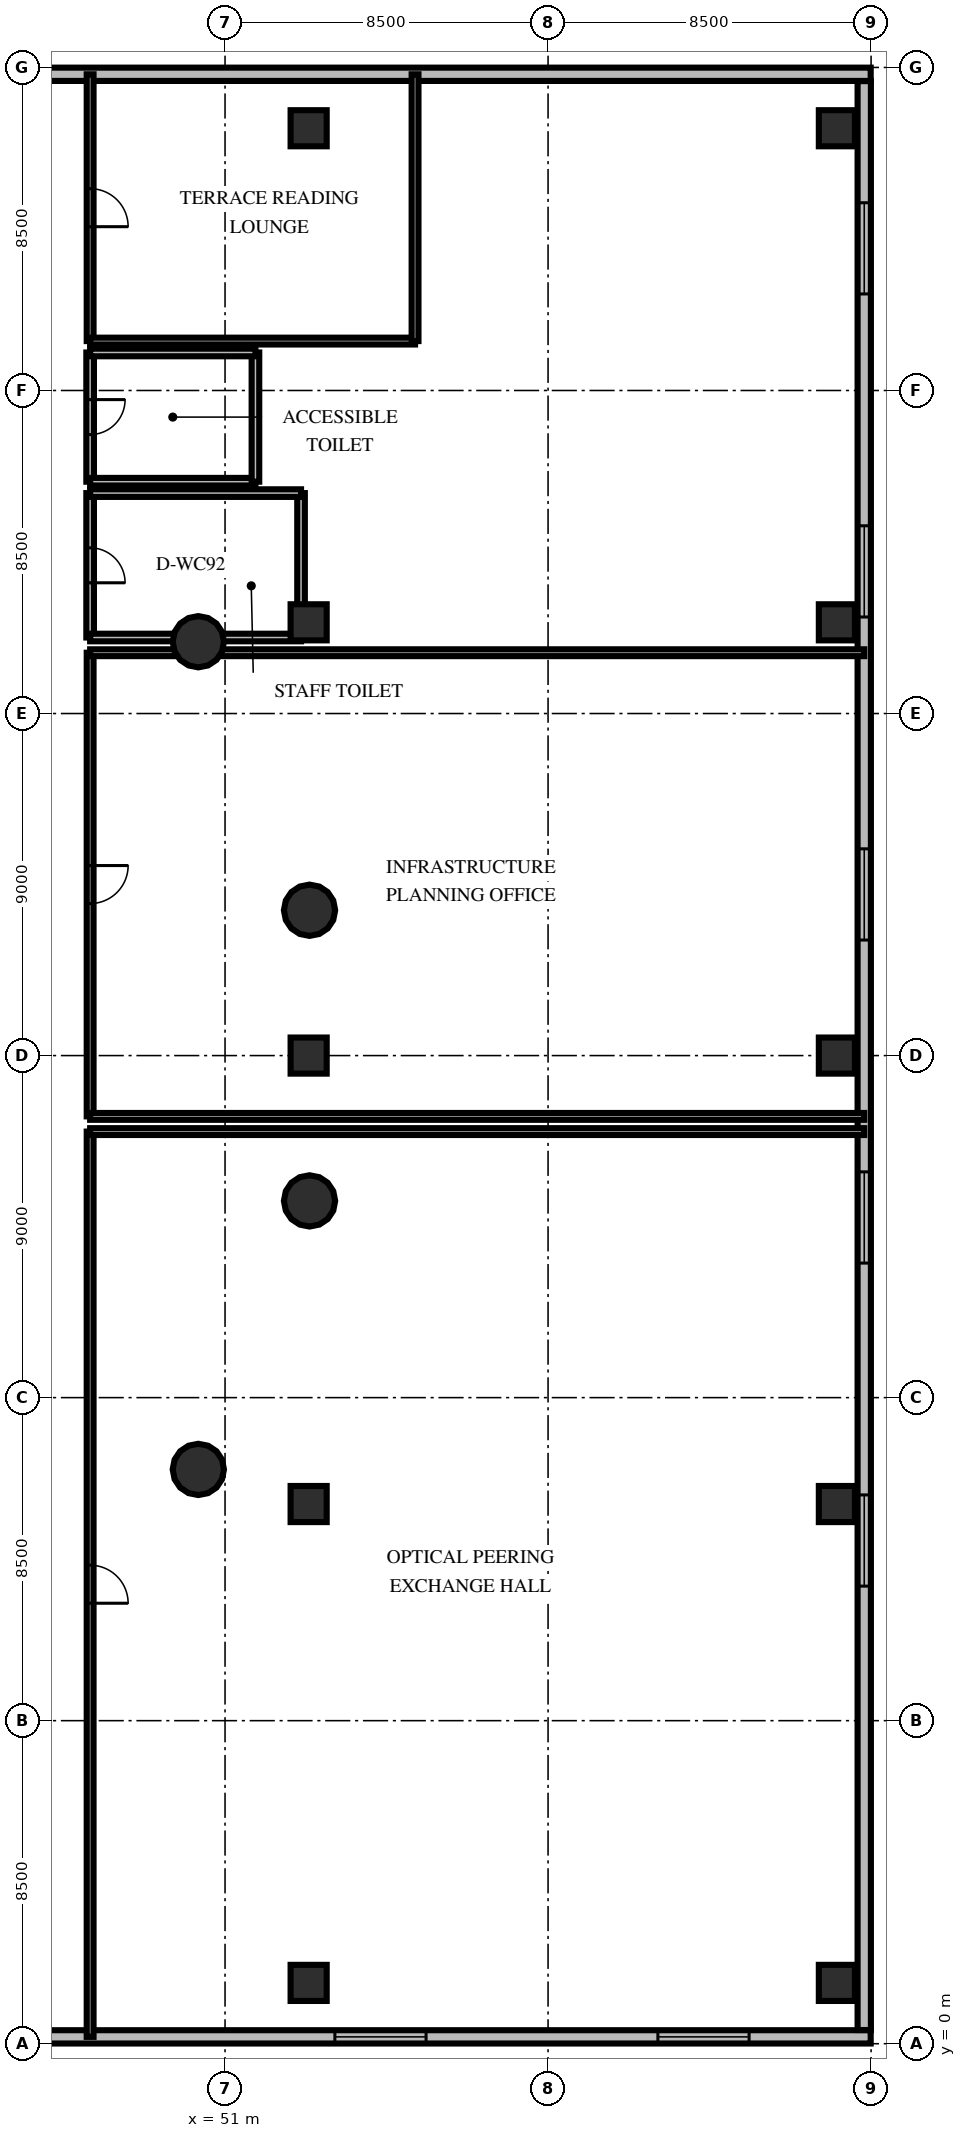
"""IFC4 building model, lengths in metres.
Left out: names, types, materials, properties, quantities, classifications, styles, units other than length and angle.
Written with IfcOpenShell. Run it as: python <this file> out.ifc"""

import sys

from ifc_helpers import new_model, si_unit, direction, frame, frame_2d, origin, origin_2d, place, context, subcontext, project, spatial, rectangle, circle, extrude, element, fill, save


model = new_model("IFC4")
c1 = context("Model", 3, precision=1e-05, world=origin(), true_north=direction((0.0, 1.0)))
c2 = subcontext(c1, "Body", "Model", "MODEL_VIEW")
j1 = project(units=[si_unit("LENGTHUNIT", "METRE"), si_unit("PLANEANGLEUNIT", "RADIAN")], contexts=[c1])
p1 = place(None, origin())
s1 = spatial("IfcSite", under=j1, at=p1, CompositionType="ELEMENT")
p2 = place(p1, origin())
s2 = spatial("IfcBuilding", under=s1, at=p2, CompositionType="ELEMENT")
p3 = place(p2, frame((0.0, 0.0, 20.4)))
s3 = spatial("IfcBuildingStorey", under=s2, at=p3, CompositionType="ELEMENT", Elevation=20.4)
for number, where, z_axis, x_axis in (
    (1, (53.2, 1.6, 0.0), (0.0, 0.0, 1.0), (1.0, 0.0, 0.0)),
    (2, (53.2, 14.2, 0.0), (0.0, 0.0, 1.0), (1.0, 0.0, 0.0)),
    (3, (53.2, 26.0, 0.0), (0.0, 0.0, 1.0), (1.0, 0.0, 0.0)),
    (4, (53.2, 37.4, 0.0), (0.0, 0.0, 1.0), (1.0, 0.0, 0.0)),
    (5, (53.2, 50.4, 0.0), (0.0, 0.0, 1.0), (1.0, 0.0, 0.0)),
    (6, (67.1, 1.6, 0.0), (0.0, 0.0, 1.0), (1.0, 0.0, 0.0)),
    (7, (67.1, 14.2, 0.0), (0.0, 0.0, 1.0), (1.0, 0.0, 0.0)),
    (8, (67.1, 26.0, 0.0), (0.0, 0.0, 1.0), (1.0, 0.0, 0.0)),
    (9, (67.1, 37.4, 0.0), (0.0, 0.0, 1.0), (1.0, 0.0, 0.0)),
    (10, (67.1, 50.4, 0.0), (0.0, 0.0, 1.0), (1.0, 0.0, 0.0)),
):
    element("IfcColumn", number, at=place(p3, frame(where, z_axis=z_axis, x_axis=x_axis)), inside=s3, PredefinedType="COLUMN", context=c2, shape_type="SweptSolid", body=[
        extrude(rectangle(XDim=0.95, YDim=0.95, at=origin_2d()), origin(), (0.0, 0.0, 1.0), 4.8),
    ])
for number, where, z_axis, x_axis in (
    (11, (53.223, 29.824, 0.0), (0.0, 0.0, 1.0), (1.0, 0.0, 0.0)),
    (12, (50.297, 36.889, 0.0), (0.0, 0.0, 1.0), (1.0, 0.0, 0.0)),
    (13, (50.297, 15.111, 0.0), (0.0, 0.0, 1.0), (1.0, 0.0, 0.0)),
    (14, (53.223, 22.176, 0.0), (0.0, 0.0, 1.0), (1.0, 0.0, 0.0)),
):
    element("IfcColumn", number, at=place(p3, frame(where, z_axis=z_axis, x_axis=x_axis)), inside=s3, PredefinedType="COLUMN", context=c2, shape_type="SweptSolid", body=[
        extrude(circle(Radius=0.675, at=origin_2d()), origin(), (0.0, 0.0, 1.0), 4.8),
    ])
p4 = place(p3, frame((67.99, 0.18, 0.0), z_axis=(0.0, 0.0, 1.0), x_axis=(-1.0, 0.0, 0.0)))
e15 = element("IfcWall", 15, at=p4, inside=s3, PredefinedType="SOLIDWALL", context=c2, shape_type="SweptSolid", body=[
    extrude(rectangle(XDim=25.42, YDim=0.35, at=frame_2d((12.71, 0.0))), origin(), (0.0, 0.0, 1.0), 3.76),
])
p5 = place(p4, frame((3.2, 0.0, 0.85)))
e16 = element("IfcOpeningElement", 16, at=p5, cuts=e15, PredefinedType="OPENING", context=c2, shape_type="SweptSolid", body=[
    extrude(rectangle(XDim=2.4, YDim=2.4, at=frame_2d((1.2, 1.2))), frame((0.0, 0.185, 0.0), z_axis=(0.0, -1.0, 0.0), x_axis=(1.0, 0.0, 0.0)), (0.0, 0.0, 1.0), 0.37),
])
p6 = place(p4, frame((11.7, 0.0, 0.85)))
e17 = element("IfcOpeningElement", 17, at=p6, cuts=e15, PredefinedType="OPENING", context=c2, shape_type="SweptSolid", body=[
    extrude(rectangle(XDim=2.4, YDim=2.4, at=frame_2d((1.2, 1.2))), frame((0.0, 0.185, 0.0), z_axis=(0.0, -1.0, 0.0), x_axis=(1.0, 0.0, 0.0)), (0.0, 0.0, 1.0), 0.37),
])
p7 = place(p3, frame((67.82, 51.64, 0.0), z_axis=(0.0, 0.0, 1.0), x_axis=(0.0, -1.0, 0.0)))
e18 = element("IfcWall", 18, at=p7, inside=s3, PredefinedType="SOLIDWALL", context=c2, shape_type="SweptSolid", body=[
    extrude(rectangle(XDim=51.28, YDim=0.35, at=frame_2d((25.64, 0.0))), origin(), (0.0, 0.0, 1.0), 3.76),
])
p8 = place(p7, frame((3.2, 0.0, 0.85)))
e19 = element("IfcOpeningElement", 19, at=p8, cuts=e18, PredefinedType="OPENING", context=c2, shape_type="SweptSolid", body=[
    extrude(rectangle(XDim=2.4, YDim=2.4, at=frame_2d((1.2, 1.2))), frame((0.0, 0.185, 0.0), z_axis=(0.0, -1.0, 0.0), x_axis=(1.0, 0.0, 0.0)), (0.0, 0.0, 1.0), 0.37),
])
p9 = place(p7, frame((11.7, 0.0, 0.85)))
e20 = element("IfcOpeningElement", 20, at=p9, cuts=e18, PredefinedType="OPENING", context=c2, shape_type="SweptSolid", body=[
    extrude(rectangle(XDim=2.4, YDim=2.4, at=frame_2d((1.2, 1.2))), frame((0.0, 0.185, 0.0), z_axis=(0.0, -1.0, 0.0), x_axis=(1.0, 0.0, 0.0)), (0.0, 0.0, 1.0), 0.37),
])
p10 = place(p7, frame((20.2, 0.0, 0.85)))
e21 = element("IfcOpeningElement", 21, at=p10, cuts=e18, PredefinedType="OPENING", context=c2, shape_type="SweptSolid", body=[
    extrude(rectangle(XDim=2.4, YDim=2.4, at=frame_2d((1.2, 1.2))), frame((0.0, 0.185, 0.0), z_axis=(0.0, -1.0, 0.0), x_axis=(1.0, 0.0, 0.0)), (0.0, 0.0, 1.0), 0.37),
])
p11 = place(p7, frame((28.7, 0.0, 0.85)))
e22 = element("IfcOpeningElement", 22, at=p11, cuts=e18, PredefinedType="OPENING", context=c2, shape_type="SweptSolid", body=[
    extrude(rectangle(XDim=2.4, YDim=2.4, at=frame_2d((1.2, 1.2))), frame((0.0, 0.185, 0.0), z_axis=(0.0, -1.0, 0.0), x_axis=(1.0, 0.0, 0.0)), (0.0, 0.0, 1.0), 0.37),
])
p12 = place(p7, frame((37.2, 0.0, 0.85)))
e23 = element("IfcOpeningElement", 23, at=p12, cuts=e18, PredefinedType="OPENING", context=c2, shape_type="SweptSolid", body=[
    extrude(rectangle(XDim=2.4, YDim=2.4, at=frame_2d((1.2, 1.2))), frame((0.0, 0.185, 0.0), z_axis=(0.0, -1.0, 0.0), x_axis=(1.0, 0.0, 0.0)), (0.0, 0.0, 1.0), 0.37),
])
p13 = place(p3, frame((42.57, 51.82, 0.0), z_axis=(0.0, 0.0, 1.0), x_axis=(1.0, 0.0, 0.0)))
e24 = element("IfcWall", 24, at=p13, inside=s3, PredefinedType="SOLIDWALL", context=c2, shape_type="SweptSolid", body=[
    extrude(rectangle(XDim=25.42, YDim=0.35, at=frame_2d((12.71, 0.0))), origin(), (0.0, 0.0, 1.0), 3.76),
])
p14 = place(p3, frame((47.45, 24.0, 0.0), z_axis=(0.0, 0.0, 1.0), x_axis=(0.0, -1.0, 0.0)))
e25 = element("IfcWall", 25, at=p14, inside=s3, PredefinedType="PARTITIONING", context=c2, shape_type="SweptSolid", body=[
    extrude(rectangle(XDim=23.82, YDim=0.18, at=frame_2d((11.91, 0.0))), origin(), (0.0, 0.0, 1.0), 3.56),
])
p15 = place(p14, frame((11.41, 0.0, 0.0)))
e26 = element("IfcOpeningElement", 26, at=p15, cuts=e25, PredefinedType="OPENING", context=c2, shape_type="SweptSolid", body=[
    extrude(rectangle(XDim=1.0, YDim=2.15, at=frame_2d((0.5, 1.075))), frame((0.0, 0.1, 0.0), z_axis=(0.0, -1.0, 0.0), x_axis=(1.0, 0.0, 0.0)), (0.0, 0.0, 1.0), 0.2),
])
p16 = place(p3, frame((67.82, 24.0, 0.0), z_axis=(0.0, 0.0, 1.0), x_axis=(-1.0, 0.0, 0.0)))
e27 = element("IfcWall", 27, at=p16, inside=s3, PredefinedType="PARTITIONING", context=c2, shape_type="SweptSolid", body=[
    extrude(rectangle(XDim=20.37, YDim=0.18, at=frame_2d((10.185, 0.0))), origin(), (0.0, 0.0, 1.0), 3.56),
])
p17 = place(p3, frame((47.45, 36.6, 0.0), z_axis=(0.0, 0.0, 1.0), x_axis=(0.0, -1.0, 0.0)))
e28 = element("IfcWall", 28, at=p17, inside=s3, PredefinedType="PARTITIONING", context=c2, shape_type="SweptSolid", body=[
    extrude(rectangle(XDim=12.2, YDim=0.18, at=frame_2d((6.1, 0.0))), origin(), (0.0, 0.0, 1.0), 3.56),
])
p18 = place(p17, frame((5.6, 0.0, 0.0)))
e29 = element("IfcOpeningElement", 29, at=p18, cuts=e28, PredefinedType="OPENING", context=c2, shape_type="SweptSolid", body=[
    extrude(rectangle(XDim=1.0, YDim=2.15, at=frame_2d((0.5, 1.075))), frame((0.0, 0.1, 0.0), z_axis=(0.0, -1.0, 0.0), x_axis=(1.0, 0.0, 0.0)), (0.0, 0.0, 1.0), 0.2),
])
for number, where, z_axis, x_axis in (
    (30, (47.45, 24.4, 0.0), (0.0, 0.0, 1.0), (1.0, 0.0, 0.0)),
    (31, (67.82, 36.6, 0.0), (0.0, 0.0, 1.0), (-1.0, 0.0, 0.0)),
):
    element("IfcWall", number, at=place(p3, frame(where, z_axis=z_axis, x_axis=x_axis)), inside=s3, PredefinedType="PARTITIONING", context=c2, shape_type="SweptSolid", body=[
        extrude(rectangle(XDim=20.37, YDim=0.18, at=frame_2d((10.185, 0.0))), origin(), (0.0, 0.0, 1.0), 3.56),
    ])
p19 = place(p3, frame((47.45, 40.8, 0.0), z_axis=(0.0, 0.0, 1.0), x_axis=(0.0, -1.0, 0.0)))
e32 = element("IfcWall", 32, at=p19, inside=s3, PredefinedType="PLUMBINGWALL", context=c2, shape_type="SweptSolid", body=[
    extrude(rectangle(XDim=3.8, YDim=0.2, at=frame_2d((1.9, 0.0))), origin(), (0.0, 0.0, 1.0), 3.56),
])
p20 = place(p19, frame((1.44, 0.0, 0.0)))
e33 = element("IfcOpeningElement", 33, at=p20, cuts=e32, PredefinedType="OPENING", context=c2, shape_type="SweptSolid", body=[
    extrude(rectangle(XDim=0.92, YDim=2.1, at=frame_2d((0.46, 1.05))), frame((0.0, 0.11, 0.0), z_axis=(0.0, -1.0, 0.0), x_axis=(1.0, 0.0, 0.0)), (0.0, 0.0, 1.0), 0.22),
])
p21 = place(p3, frame((47.45, 37.0, 0.0), z_axis=(0.0, 0.0, 1.0), x_axis=(1.0, 0.0, 0.0)))
e34 = element("IfcWall", 34, at=p21, inside=s3, PredefinedType="PLUMBINGWALL", context=c2, shape_type="SweptSolid", body=[
    extrude(rectangle(XDim=5.55, YDim=0.2, at=frame_2d((2.775, 0.0))), origin(), (0.0, 0.0, 1.0), 3.56),
])
p22 = place(p3, frame((53.0, 37.0, 0.0), z_axis=(0.0, 0.0, 1.0), x_axis=(0.0, 1.0, 0.0)))
e35 = element("IfcWall", 35, at=p22, inside=s3, PredefinedType="PLUMBINGWALL", context=c2, shape_type="SweptSolid", body=[
    extrude(rectangle(XDim=3.8, YDim=0.2, at=frame_2d((1.9, 0.0))), origin(), (0.0, 0.0, 1.0), 3.56),
])
p23 = place(p3, frame((53.0, 40.8, 0.0), z_axis=(0.0, 0.0, 1.0), x_axis=(-1.0, 0.0, 0.0)))
e36 = element("IfcWall", 36, at=p23, inside=s3, PredefinedType="PLUMBINGWALL", context=c2, shape_type="SweptSolid", body=[
    extrude(rectangle(XDim=5.55, YDim=0.2, at=frame_2d((2.775, 0.0))), origin(), (0.0, 0.0, 1.0), 3.56),
])
p24 = place(p3, frame((47.45, 44.5, 0.0), z_axis=(0.0, 0.0, 1.0), x_axis=(0.0, -1.0, 0.0)))
e37 = element("IfcWall", 37, at=p24, inside=s3, PredefinedType="PLUMBINGWALL", context=c2, shape_type="SweptSolid", body=[
    extrude(rectangle(XDim=3.4, YDim=0.2, at=frame_2d((1.7, 0.0))), origin(), (0.0, 0.0, 1.0), 3.56),
])
p25 = place(p24, frame((1.24, 0.0, 0.0)))
e38 = element("IfcOpeningElement", 38, at=p25, cuts=e37, PredefinedType="OPENING", context=c2, shape_type="SweptSolid", body=[
    extrude(rectangle(XDim=0.92, YDim=2.1, at=frame_2d((0.46, 1.05))), frame((0.0, 0.11, 0.0), z_axis=(0.0, -1.0, 0.0), x_axis=(1.0, 0.0, 0.0)), (0.0, 0.0, 1.0), 0.22),
])
p26 = place(p3, frame((47.45, 41.1, 0.0), z_axis=(0.0, 0.0, 1.0), x_axis=(1.0, 0.0, 0.0)))
e39 = element("IfcWall", 39, at=p26, inside=s3, PredefinedType="PLUMBINGWALL", context=c2, shape_type="SweptSolid", body=[
    extrude(rectangle(XDim=4.35, YDim=0.2, at=frame_2d((2.175, 0.0))), origin(), (0.0, 0.0, 1.0), 3.56),
])
p27 = place(p3, frame((51.8, 41.1, 0.0), z_axis=(0.0, 0.0, 1.0), x_axis=(0.0, 1.0, 0.0)))
e40 = element("IfcWall", 40, at=p27, inside=s3, PredefinedType="PLUMBINGWALL", context=c2, shape_type="SweptSolid", body=[
    extrude(rectangle(XDim=3.4, YDim=0.2, at=frame_2d((1.7, 0.0))), origin(), (0.0, 0.0, 1.0), 3.56),
])
p28 = place(p3, frame((51.8, 44.5, 0.0), z_axis=(0.0, 0.0, 1.0), x_axis=(-1.0, 0.0, 0.0)))
e41 = element("IfcWall", 41, at=p28, inside=s3, PredefinedType="PLUMBINGWALL", context=c2, shape_type="SweptSolid", body=[
    extrude(rectangle(XDim=4.35, YDim=0.2, at=frame_2d((2.175, 0.0))), origin(), (0.0, 0.0, 1.0), 3.56),
])
p29 = place(p3, frame((47.45, 51.82, 0.0), z_axis=(0.0, 0.0, 1.0), x_axis=(0.0, -1.0, 0.0)))
e42 = element("IfcWall", 42, at=p29, inside=s3, PredefinedType="PARTITIONING", context=c2, shape_type="SweptSolid", body=[
    extrude(rectangle(XDim=7.02, YDim=0.18, at=frame_2d((3.51, 0.0))), origin(), (0.0, 0.0, 1.0), 3.56),
])
p30 = place(p29, frame((3.01, 0.0, 0.0)))
e43 = element("IfcOpeningElement", 43, at=p30, cuts=e42, PredefinedType="OPENING", context=c2, shape_type="SweptSolid", body=[
    extrude(rectangle(XDim=1.0, YDim=2.15, at=frame_2d((0.5, 1.075))), frame((0.0, 0.1, 0.0), z_axis=(0.0, -1.0, 0.0), x_axis=(1.0, 0.0, 0.0)), (0.0, 0.0, 1.0), 0.2),
])
p31 = place(p3, frame((47.45, 44.8, 0.0), z_axis=(0.0, 0.0, 1.0), x_axis=(1.0, 0.0, 0.0)))
e44 = element("IfcWall", 44, at=p31, inside=s3, PredefinedType="PARTITIONING", context=c2, shape_type="SweptSolid", body=[
    extrude(rectangle(XDim=8.55, YDim=0.18, at=frame_2d((4.275, 0.0))), origin(), (0.0, 0.0, 1.0), 3.56),
])
p32 = place(p3, frame((56.0, 44.8, 0.0), z_axis=(0.0, 0.0, 1.0), x_axis=(0.0, 1.0, 0.0)))
e45 = element("IfcWall", 45, at=p32, inside=s3, PredefinedType="PARTITIONING", context=c2, shape_type="SweptSolid", body=[
    extrude(rectangle(XDim=7.02, YDim=0.18, at=frame_2d((3.51, 0.0))), origin(), (0.0, 0.0, 1.0), 3.56),
])
p33 = place(p5, origin())
e46 = element("IfcWindow", 46, at=p33, inside=s3, PartitioningType="SINGLE_PANEL", PredefinedType="WINDOW", context=c2, shape_type="SweptSolid", body=[
    extrude(rectangle(XDim=2.4, YDim=2.4, at=frame_2d((1.2, 1.2))), frame((0.0, 0.03, 0.0), z_axis=(0.0, -1.0, 0.0), x_axis=(1.0, 0.0, 0.0)), (0.0, 0.0, 1.0), 0.06),
])
fill(e16, e46)
p34 = place(p6, origin())
e47 = element("IfcWindow", 47, at=p34, inside=s3, PartitioningType="SINGLE_PANEL", PredefinedType="WINDOW", context=c2, shape_type="SweptSolid", body=[
    extrude(rectangle(XDim=2.4, YDim=2.4, at=frame_2d((1.2, 1.2))), frame((0.0, 0.03, 0.0), z_axis=(0.0, -1.0, 0.0), x_axis=(1.0, 0.0, 0.0)), (0.0, 0.0, 1.0), 0.06),
])
fill(e17, e47)
p35 = place(p8, origin())
e48 = element("IfcWindow", 48, at=p35, inside=s3, PartitioningType="SINGLE_PANEL", PredefinedType="WINDOW", context=c2, shape_type="SweptSolid", body=[
    extrude(rectangle(XDim=2.4, YDim=2.4, at=frame_2d((1.2, 1.2))), frame((0.0, 0.03, 0.0), z_axis=(0.0, -1.0, 0.0), x_axis=(1.0, 0.0, 0.0)), (0.0, 0.0, 1.0), 0.06),
])
fill(e19, e48)
p36 = place(p9, origin())
e49 = element("IfcWindow", 49, at=p36, inside=s3, PartitioningType="SINGLE_PANEL", PredefinedType="WINDOW", context=c2, shape_type="SweptSolid", body=[
    extrude(rectangle(XDim=2.4, YDim=2.4, at=frame_2d((1.2, 1.2))), frame((0.0, 0.03, 0.0), z_axis=(0.0, -1.0, 0.0), x_axis=(1.0, 0.0, 0.0)), (0.0, 0.0, 1.0), 0.06),
])
fill(e20, e49)
p37 = place(p10, origin())
e50 = element("IfcWindow", 50, at=p37, inside=s3, PartitioningType="SINGLE_PANEL", PredefinedType="WINDOW", context=c2, shape_type="SweptSolid", body=[
    extrude(rectangle(XDim=2.4, YDim=2.4, at=frame_2d((1.2, 1.2))), frame((0.0, 0.03, 0.0), z_axis=(0.0, -1.0, 0.0), x_axis=(1.0, 0.0, 0.0)), (0.0, 0.0, 1.0), 0.06),
])
fill(e21, e50)
p38 = place(p11, origin())
e51 = element("IfcWindow", 51, at=p38, inside=s3, PartitioningType="SINGLE_PANEL", PredefinedType="WINDOW", context=c2, shape_type="SweptSolid", body=[
    extrude(rectangle(XDim=2.4, YDim=2.4, at=frame_2d((1.2, 1.2))), frame((0.0, 0.03, 0.0), z_axis=(0.0, -1.0, 0.0), x_axis=(1.0, 0.0, 0.0)), (0.0, 0.0, 1.0), 0.06),
])
fill(e22, e51)
p39 = place(p12, origin())
e52 = element("IfcWindow", 52, at=p39, inside=s3, PartitioningType="SINGLE_PANEL", PredefinedType="WINDOW", context=c2, shape_type="SweptSolid", body=[
    extrude(rectangle(XDim=2.4, YDim=2.4, at=frame_2d((1.2, 1.2))), frame((0.0, 0.03, 0.0), z_axis=(0.0, -1.0, 0.0), x_axis=(1.0, 0.0, 0.0)), (0.0, 0.0, 1.0), 0.06),
])
fill(e23, e52)
p40 = place(p15, origin())
e53 = element("IfcDoor", 53, at=p40, inside=s3, OperationType="SINGLE_SWING_RIGHT", PredefinedType="DOOR", context=c2, shape_type="SweptSolid", body=[
    extrude(rectangle(XDim=1.0, YDim=2.15, at=frame_2d((0.5, 1.075))), frame((0.0, 0.025, 0.0), z_axis=(0.0, -1.0, 0.0), x_axis=(1.0, 0.0, 0.0)), (0.0, 0.0, 1.0), 0.05),
])
fill(e26, e53)
p41 = place(p18, origin())
e54 = element("IfcDoor", 54, at=p41, inside=s3, OperationType="SINGLE_SWING_LEFT", PredefinedType="DOOR", context=c2, shape_type="SweptSolid", body=[
    extrude(rectangle(XDim=1.0, YDim=2.15, at=frame_2d((0.5, 1.075))), frame((0.0, 0.025, 0.0), z_axis=(0.0, -1.0, 0.0), x_axis=(1.0, 0.0, 0.0)), (0.0, 0.0, 1.0), 0.05),
])
fill(e29, e54)
p42 = place(p20, origin())
e55 = element("IfcDoor", 55, at=p42, inside=s3, OperationType="SINGLE_SWING_RIGHT", PredefinedType="DOOR", context=c2, shape_type="SweptSolid", body=[
    extrude(rectangle(XDim=0.92, YDim=2.1, at=frame_2d((0.46, 1.05))), frame((0.0, 0.025, 0.0), z_axis=(0.0, -1.0, 0.0), x_axis=(1.0, 0.0, 0.0)), (0.0, 0.0, 1.0), 0.05),
])
fill(e33, e55)
p43 = place(p25, origin())
e56 = element("IfcDoor", 56, at=p43, inside=s3, OperationType="SINGLE_SWING_LEFT", PredefinedType="DOOR", context=c2, shape_type="SweptSolid", body=[
    extrude(rectangle(XDim=0.92, YDim=2.1, at=frame_2d((0.46, 1.05))), frame((0.0, 0.025, 0.0), z_axis=(0.0, -1.0, 0.0), x_axis=(1.0, 0.0, 0.0)), (0.0, 0.0, 1.0), 0.05),
])
fill(e38, e56)
p44 = place(p30, origin())
e57 = element("IfcDoor", 57, at=p44, inside=s3, OperationType="SINGLE_SWING_RIGHT", PredefinedType="DOOR", context=c2, shape_type="SweptSolid", body=[
    extrude(rectangle(XDim=1.0, YDim=2.15, at=frame_2d((0.5, 1.075))), frame((0.0, 0.025, 0.0), z_axis=(0.0, -1.0, 0.0), x_axis=(1.0, 0.0, 0.0)), (0.0, 0.0, 1.0), 0.05),
])
fill(e43, e57)
save(model, sys.argv[1])
